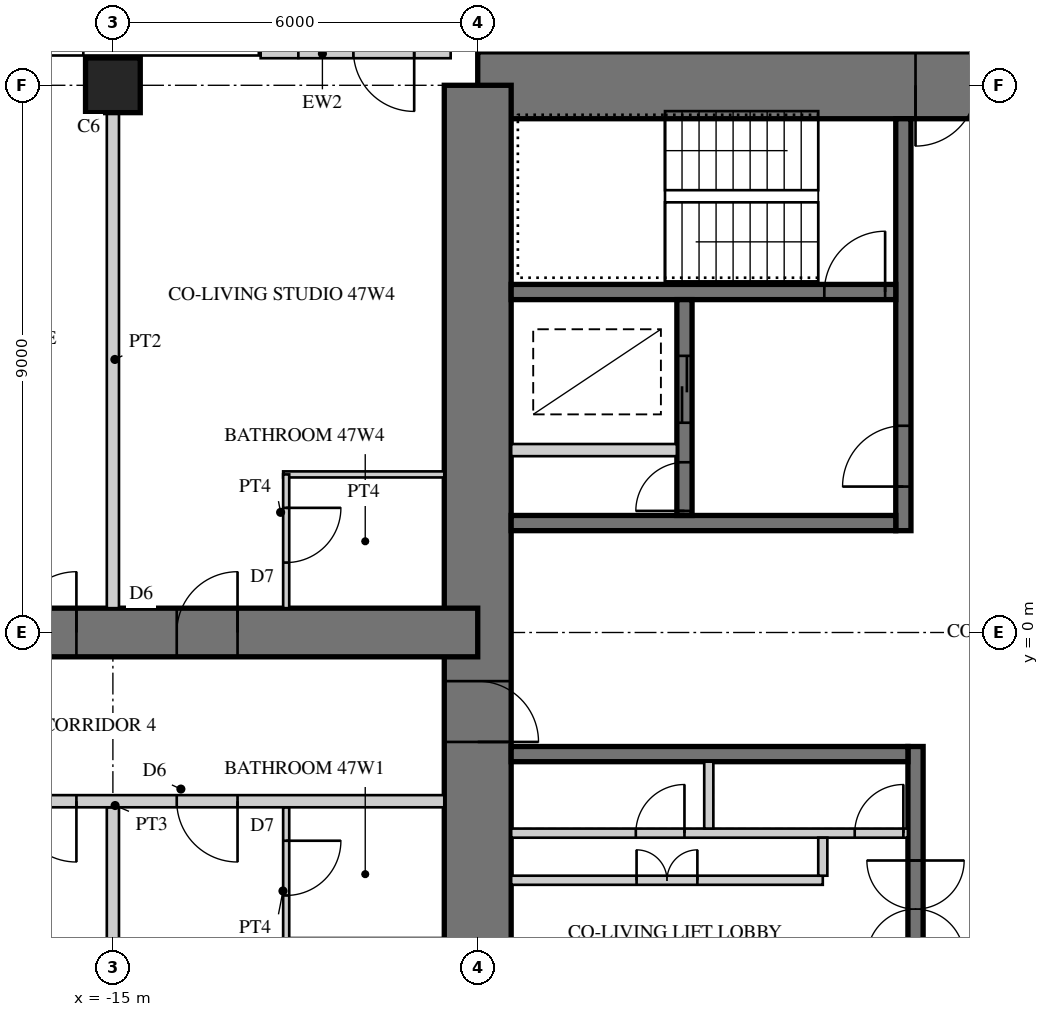
"""IFC4 building model, lengths in metres.
Left out: names, types, materials, properties, quantities, classifications, styles, units other than length and angle.
Written with IfcOpenShell. Run it as: python <this file> out.ifc"""

import sys

from ifc_helpers import new_model, si_unit, direction, frame, frame_2d, origin, origin_2d, place, context, subcontext, project, spatial, rectangle, hollow_rectangle, extrude, element, fill, save


model = new_model("IFC4")
c1 = context("Model", 3, precision=1e-05, world=origin(), true_north=direction((0.0, 1.0)))
c2 = subcontext(c1, "Body", "Model", "MODEL_VIEW")
j1 = project(units=[si_unit("LENGTHUNIT", "METRE"), si_unit("PLANEANGLEUNIT", "RADIAN")], contexts=[c1])
p1 = place(None, origin())
s1 = spatial("IfcSite", under=j1, at=p1, CompositionType="ELEMENT")
p2 = place(p1, origin())
s2 = spatial("IfcBuilding", under=s1, at=p2, CompositionType="ELEMENT")
p3 = place(p2, frame((0.0, 0.0, 189.9)))
s3 = spatial("IfcBuildingStorey", under=s2, at=p3, CompositionType="ELEMENT", Elevation=189.9)
p4 = place(p3, frame((9.0, 9.0, 0.0), z_axis=(0.0, 0.0, 1.0), x_axis=(-1.0, 0.0, 0.0)))
e1 = element("IfcWall", 1, at=p4, inside=s3, PredefinedType="SHEAR", context=c2, shape_type="SweptSolid", body=[
    extrude(rectangle(XDim=18.0, YDim=1.1, at=frame_2d((9.0, 0.0))), origin(), (0.0, 0.0, 1.0), 3.4),
])
p5 = place(p4, frame((9.8, 0.0, 0.0)))
e2 = element("IfcOpeningElement", 2, at=p5, cuts=e1, PredefinedType="OPENING", context=c2, shape_type="SweptSolid", body=[
    extrude(rectangle(XDim=1.0, YDim=2.4, at=frame_2d((0.5, 1.2))), frame((0.0, 0.56, 0.0), z_axis=(0.0, -1.0, 0.0), x_axis=(1.0, 0.0, 0.0)), (0.0, 0.0, 1.0), 1.12),
])
p6 = place(p3, frame((-9.0, 9.0, 0.0), z_axis=(0.0, 0.0, 1.0), x_axis=(0.0, -1.0, 0.0)))
e3 = element("IfcWall", 3, at=p6, inside=s3, PredefinedType="SHEAR", context=c2, shape_type="SweptSolid", body=[
    extrude(rectangle(XDim=18.0, YDim=1.1, at=frame_2d((9.0, 0.0))), origin(), (0.0, 0.0, 1.0), 3.4),
])
p7 = place(p6, frame((9.8, 0.0, 0.0)))
e4 = element("IfcOpeningElement", 4, at=p7, cuts=e3, PredefinedType="OPENING", context=c2, shape_type="SweptSolid", body=[
    extrude(rectangle(XDim=1.0, YDim=2.4, at=frame_2d((0.5, 1.2))), frame((0.0, 0.56, 0.0), z_axis=(0.0, -1.0, 0.0), x_axis=(1.0, 0.0, 0.0)), (0.0, 0.0, 1.0), 1.12),
])
p8 = place(p3, frame((-2.0, 1.675, 0.0), z_axis=(0.0, 0.0, 1.0), x_axis=(0.0, 1.0, 0.0)))
e5 = element("IfcWall", 5, at=p8, inside=s3, PredefinedType="SHEAR", context=c2, shape_type="SweptSolid", body=[
    extrude(rectangle(XDim=6.775, YDim=0.25, at=frame_2d((3.387, 0.0))), origin(), (0.0, 0.0, 1.0), 3.4),
])
p9 = place(p8, frame((0.725, 0.0, 0.0)))
e6 = element("IfcOpeningElement", 6, at=p9, cuts=e5, PredefinedType="OPENING", context=c2, shape_type="SweptSolid", body=[
    extrude(rectangle(XDim=1.0, YDim=2.1, at=frame_2d((0.5, 1.05))), frame((0.0, 0.135, 0.0), z_axis=(0.0, -1.0, 0.0), x_axis=(1.0, 0.0, 0.0)), (0.0, 0.0, 1.0), 0.27),
])
p10 = place(p3, frame((-2.125, 1.8, 0.0), z_axis=(0.0, 0.0, 1.0), x_axis=(-1.0, 0.0, 0.0)))
e7 = element("IfcWall", 7, at=p10, inside=s3, PredefinedType="SHEAR", context=c2, shape_type="SweptSolid", body=[
    extrude(rectangle(XDim=6.325, YDim=0.25, at=frame_2d((3.163, 0.0))), origin(), (0.0, 0.0, 1.0), 3.4),
])
p11 = place(p3, frame((-2.125, 5.6, 0.0), z_axis=(0.0, 0.0, 1.0), x_axis=(-1.0, 0.0, 0.0)))
e8 = element("IfcWall", 8, at=p11, inside=s3, PredefinedType="SHEAR", context=c2, shape_type="SweptSolid", body=[
    extrude(rectangle(XDim=6.325, YDim=0.25, at=frame_2d((3.163, 0.0))), origin(), (0.0, 0.0, 1.0), 3.4),
])
p12 = place(p11, frame((0.175, 0.0, 0.0)))
e9 = element("IfcOpeningElement", 9, at=p12, cuts=e8, PredefinedType="OPENING", context=c2, shape_type="SweptSolid", body=[
    extrude(rectangle(XDim=1.0, YDim=2.1, at=frame_2d((0.5, 1.05))), frame((0.0, 0.135, 0.0), z_axis=(0.0, -1.0, 0.0), x_axis=(1.0, 0.0, 0.0)), (0.0, 0.0, 1.0), 0.27),
])
p13 = place(p3, frame((-5.6, 1.925, 0.0), z_axis=(0.0, 0.0, 1.0), x_axis=(0.0, 1.0, 0.0)))
e10 = element("IfcWall", 10, at=p13, inside=s3, PredefinedType="SHEAR", context=c2, shape_type="SweptSolid", body=[
    extrude(rectangle(XDim=3.55, YDim=0.25, at=frame_2d((1.775, 0.0))), origin(), (0.0, 0.0, 1.0), 3.4),
])
p14 = place(p13, frame((1.525, 0.0, 0.0)))
e11 = element("IfcOpeningElement", 11, at=p14, cuts=e10, PredefinedType="OPENING", context=c2, shape_type="SweptSolid", body=[
    extrude(rectangle(XDim=1.1, YDim=2.2, at=frame_2d((0.55, 1.1))), frame((0.0, 0.135, 0.0), z_axis=(0.0, -1.0, 0.0), x_axis=(1.0, 0.0, 0.0)), (0.0, 0.0, 1.0), 0.27),
])
p15 = place(p13, frame((0.075, 0.0, 0.0)))
e12 = element("IfcOpeningElement", 12, at=p15, cuts=e10, PredefinedType="OPENING", context=c2, shape_type="SweptSolid", body=[
    extrude(rectangle(XDim=0.8, YDim=2.1, at=frame_2d((0.4, 1.05))), frame((0.0, 0.135, 0.0), z_axis=(0.0, -1.0, 0.0), x_axis=(1.0, 0.0, 0.0)), (0.0, 0.0, 1.0), 0.27),
])
p16 = place(p3, frame((-5.725, 3.0, 0.0), z_axis=(0.0, 0.0, 1.0), x_axis=(-1.0, 0.0, 0.0)))
e13 = element("IfcWall", 13, at=p16, inside=s3, PredefinedType="PARTITIONING", context=c2, shape_type="SweptSolid", body=[
    extrude(rectangle(XDim=2.725, YDim=0.2, at=frame_2d((1.362, 0.0))), origin(), (0.0, 0.0, 1.0), 3.4),
])
p17 = place(p3, frame((-1.8, -1.875, 0.0), z_axis=(0.0, 0.0, 1.0), x_axis=(0.0, -1.0, 0.0)))
e14 = element("IfcWall", 14, at=p17, inside=s3, PredefinedType="SHEAR", context=c2, shape_type="SweptSolid", body=[
    extrude(rectangle(XDim=6.575, YDim=0.25, at=frame_2d((3.288, 0.0))), origin(), (0.0, 0.0, 1.0), 3.4),
])
p18 = place(p17, frame((1.875, 0.0, 0.0)))
e15 = element("IfcOpeningElement", 15, at=p18, cuts=e14, PredefinedType="OPENING", context=c2, shape_type="SweptSolid", body=[
    extrude(rectangle(XDim=1.6, YDim=2.4, at=frame_2d((0.8, 1.2))), frame((0.0, 0.135, 0.0), z_axis=(0.0, -1.0, 0.0), x_axis=(1.0, 0.0, 0.0)), (0.0, 0.0, 1.0), 0.27),
])
p19 = place(p3, frame((-1.925, -2.0, 0.0), z_axis=(0.0, 0.0, 1.0), x_axis=(-1.0, 0.0, 0.0)))
e16 = element("IfcWall", 16, at=p19, inside=s3, PredefinedType="SHEAR", context=c2, shape_type="SweptSolid", body=[
    extrude(rectangle(XDim=6.525, YDim=0.25, at=frame_2d((3.262, 0.0))), origin(), (0.0, 0.0, 1.0), 3.4),
])
p20 = place(p3, frame((-1.925, -3.3, 0.0), z_axis=(0.0, 0.0, 1.0), x_axis=(-1.0, 0.0, 0.0)))
e17 = element("IfcWall", 17, at=p20, inside=s3, PredefinedType="PARTITIONING", context=c2, shape_type="SweptSolid", body=[
    extrude(rectangle(XDim=6.525, YDim=0.15, at=frame_2d((3.262, 0.0))), origin(), (0.0, 0.0, 1.0), 3.4),
])
p21 = place(p20, frame((0.075, 0.0, 0.0)))
e18 = element("IfcOpeningElement", 18, at=p21, cuts=e17, PredefinedType="OPENING", context=c2, shape_type="SweptSolid", body=[
    extrude(rectangle(XDim=0.8, YDim=2.1, at=frame_2d((0.4, 1.05))), frame((0.0, 0.085, 0.0), z_axis=(0.0, -1.0, 0.0), x_axis=(1.0, 0.0, 0.0)), (0.0, 0.0, 1.0), 0.17),
])
p22 = place(p20, frame((3.675, 0.0, 0.0)))
e19 = element("IfcOpeningElement", 19, at=p22, cuts=e17, PredefinedType="OPENING", context=c2, shape_type="SweptSolid", body=[
    extrude(rectangle(XDim=0.8, YDim=2.1, at=frame_2d((0.4, 1.05))), frame((0.0, 0.085, 0.0), z_axis=(0.0, -1.0, 0.0), x_axis=(1.0, 0.0, 0.0)), (0.0, 0.0, 1.0), 0.17),
])
p23 = place(p3, frame((-5.2, -2.125, 0.0), z_axis=(0.0, 0.0, 1.0), x_axis=(0.0, -1.0, 0.0)))
e20 = element("IfcWall", 20, at=p23, inside=s3, PredefinedType="PARTITIONING", context=c2, shape_type="SweptSolid", body=[
    extrude(rectangle(XDim=1.1, YDim=0.15, at=frame_2d((0.55, 0.0))), origin(), (0.0, 0.0, 1.0), 3.4),
])
p24 = place(p3, frame((-9.0, 0.0, 0.0), z_axis=(0.0, 0.0, 1.0), x_axis=(-1.0, 0.0, 0.0)))
e21 = element("IfcWall", 21, at=p24, inside=s3, PredefinedType="SHEAR", context=c2, shape_type="SweptSolid", body=[
    extrude(rectangle(XDim=18.0, YDim=0.8, at=frame_2d((9.0, 0.0))), origin(), (0.0, 0.0, 1.0), 3.4),
])
p25 = place(p24, frame((3.95, 0.0, 0.0)))
e22 = element("IfcOpeningElement", 22, at=p25, cuts=e21, PredefinedType="OPENING", context=c2, shape_type="SweptSolid", body=[
    extrude(rectangle(XDim=1.0, YDim=2.15, at=frame_2d((0.5, 1.075))), frame((0.0, 0.41, 0.0), z_axis=(0.0, -1.0, 0.0), x_axis=(1.0, 0.0, 0.0)), (0.0, 0.0, 1.0), 0.82),
])
p26 = place(p24, frame((6.6, 0.0, 0.0)))
e23 = element("IfcOpeningElement", 23, at=p26, cuts=e21, PredefinedType="OPENING", context=c2, shape_type="SweptSolid", body=[
    extrude(rectangle(XDim=1.0, YDim=2.15, at=frame_2d((0.5, 1.075))), frame((0.0, 0.41, 0.0), z_axis=(0.0, -1.0, 0.0), x_axis=(1.0, 0.0, 0.0)), (0.0, 0.0, 1.0), 0.82),
])
p27 = place(p24, frame((13.25, 0.0, 0.0)))
e24 = element("IfcOpeningElement", 24, at=p27, cuts=e21, PredefinedType="OPENING", context=c2, shape_type="SweptSolid", body=[
    extrude(rectangle(XDim=1.0, YDim=2.2, at=frame_2d((0.5, 1.1))), frame((0.0, 0.41, 0.0), z_axis=(0.0, -1.0, 0.0), x_axis=(1.0, 0.0, 0.0)), (0.0, 0.0, 1.0), 0.82),
])
p28 = place(p3, frame((-15.0, 9.0, 0.0), z_axis=(0.0, 0.0, 1.0), x_axis=(1.0, 0.0, 0.0)))
e25 = element("IfcColumn", 25, at=p28, inside=s3, PredefinedType="COLUMN", context=c2, shape_type="SweptSolid", body=[
    extrude(rectangle(XDim=0.9, YDim=0.9, at=origin_2d()), origin(), (0.0, 0.0, 1.0), 3.4),
])
p29 = place(p3, frame((-9.445, 9.57, 0.0), z_axis=(0.0, 0.0, 1.0), x_axis=(-1.0, 0.0, 0.0)))
e26 = element("IfcWall", 26, at=p29, inside=s3, PredefinedType="SOLIDWALL", context=c2, shape_type="SweptSolid", body=[
    extrude(rectangle(XDim=3.125, YDim=0.25, at=frame_2d((1.562, 0.0))), origin(), (0.0, 0.0, 1.0), 3.22),
])
p30 = place(p29, frame((0.6, 0.0, 0.0)))
e27 = element("IfcOpeningElement", 27, at=p30, cuts=e26, PredefinedType="OPENING", context=c2, shape_type="SweptSolid", body=[
    extrude(rectangle(XDim=1.0, YDim=2.2, at=frame_2d((0.5, 1.1))), frame((0.0, 0.135, 0.0), z_axis=(0.0, -1.0, 0.0), x_axis=(1.0, 0.0, 0.0)), (0.0, 0.0, 1.0), 0.27),
])
p31 = place(p3, frame((-3.325, -4.075, 0.0), z_axis=(0.0, 0.0, 1.0), x_axis=(-1.0, 0.0, 0.0)))
e28 = element("IfcWall", 28, at=p31, inside=s3, PredefinedType="PARTITIONING", context=c2, shape_type="SweptSolid", body=[
    extrude(rectangle(XDim=5.125, YDim=0.15, at=frame_2d((2.562, 0.0))), origin(), (0.0, 0.0, 1.0), 3.22),
])
p32 = place(p31, frame((2.062, 0.0, 0.0)))
e29 = element("IfcOpeningElement", 29, at=p32, cuts=e28, PredefinedType="OPENING", context=c2, shape_type="SweptSolid", body=[
    extrude(rectangle(XDim=1.0, YDim=2.1, at=frame_2d((0.5, 1.05))), frame((0.0, 0.085, 0.0), z_axis=(0.0, -1.0, 0.0), x_axis=(1.0, 0.0, 0.0)), (0.0, 0.0, 1.0), 0.17),
])
p33 = place(p3, frame((-3.325, -3.375, 0.0), z_axis=(0.0, 0.0, 1.0), x_axis=(0.0, -1.0, 0.0)))
e30 = element("IfcWall", 30, at=p33, inside=s3, PredefinedType="PARTITIONING", context=c2, shape_type="SweptSolid", body=[
    extrude(rectangle(XDim=0.625, YDim=0.15, at=frame_2d((0.312, 0.0))), origin(), (0.0, 0.0, 1.0), 3.22),
])
p34 = place(p3, frame((-12.15, -2.875, 0.0), z_axis=(0.0, 0.0, 1.0), x_axis=(0.0, -1.0, 0.0)))
e31 = element("IfcWall", 31, at=p34, inside=s3, PredefinedType="PARTITIONING", context=c2, shape_type="SweptSolid", body=[
    extrude(rectangle(XDim=2.2, YDim=0.1, at=frame_2d((1.1, 0.0))), origin(), (0.0, 0.0, 1.0), 3.22),
])
p35 = place(p34, frame((0.55, 0.0, 0.0)))
e32 = element("IfcOpeningElement", 32, at=p35, cuts=e31, PredefinedType="OPENING", context=c2, shape_type="SweptSolid", body=[
    extrude(rectangle(XDim=0.9, YDim=2.1, at=frame_2d((0.45, 1.05))), frame((0.0, 0.06, 0.0), z_axis=(0.0, -1.0, 0.0), x_axis=(1.0, 0.0, 0.0)), (0.0, 0.0, 1.0), 0.12),
])
p36 = place(p3, frame((-9.55, 2.6, 0.0), z_axis=(0.0, 0.0, 1.0), x_axis=(-1.0, 0.0, 0.0)))
e33 = element("IfcWall", 33, at=p36, inside=s3, PredefinedType="PARTITIONING", context=c2, shape_type="SweptSolid", body=[
    extrude(rectangle(XDim=2.65, YDim=0.1, at=frame_2d((1.325, 0.0))), origin(), (0.0, 0.0, 1.0), 3.22),
])
p37 = place(p3, frame((-12.15, 2.6, 0.0), z_axis=(0.0, 0.0, 1.0), x_axis=(0.0, -1.0, 0.0)))
e34 = element("IfcWall", 34, at=p37, inside=s3, PredefinedType="PARTITIONING", context=c2, shape_type="SweptSolid", body=[
    extrude(rectangle(XDim=2.2, YDim=0.1, at=frame_2d((1.1, 0.0))), origin(), (0.0, 0.0, 1.0), 3.22),
])
p38 = place(p37, frame((0.55, 0.0, 0.0)))
e35 = element("IfcOpeningElement", 35, at=p38, cuts=e34, PredefinedType="OPENING", context=c2, shape_type="SweptSolid", body=[
    extrude(rectangle(XDim=0.9, YDim=2.1, at=frame_2d((0.45, 1.05))), frame((0.0, 0.06, 0.0), z_axis=(0.0, -1.0, 0.0), x_axis=(1.0, 0.0, 0.0)), (0.0, 0.0, 1.0), 0.12),
])
p39 = place(p3, frame((-15.0, -2.875, 0.0), z_axis=(0.0, 0.0, 1.0), x_axis=(0.0, -1.0, 0.0)))
e36 = element("IfcWall", 36, at=p39, inside=s3, PredefinedType="SOLIDWALL", context=c2, shape_type="SweptSolid", body=[
    extrude(rectangle(XDim=5.675, YDim=0.2, at=frame_2d((2.837, 0.0))), origin(), (0.0, 0.0, 1.0), 2.47),
])
p40 = place(p3, frame((-15.0, 8.55, 0.0), z_axis=(0.0, 0.0, 1.0), x_axis=(0.0, -1.0, 0.0)))
e37 = element("IfcWall", 37, at=p40, inside=s3, PredefinedType="SOLIDWALL", context=c2, shape_type="SweptSolid", body=[
    extrude(rectangle(XDim=8.15, YDim=0.2, at=frame_2d((4.075, 0.0))), origin(), (0.0, 0.0, 1.0), 2.47),
])
p41 = place(p3, frame((-9.55, -2.775, 0.0), z_axis=(0.0, 0.0, 1.0), x_axis=(-1.0, 0.0, 0.0)))
e38 = element("IfcWall", 38, at=p41, inside=s3, PredefinedType="SOLIDWALL", context=c2, shape_type="SweptSolid", body=[
    extrude(rectangle(XDim=11.45, YDim=0.2, at=frame_2d((5.725, 0.0))), origin(), (0.0, 0.0, 1.0), 3.22),
])
p42 = place(p41, frame((3.4, 0.0, 0.0)))
e39 = element("IfcOpeningElement", 39, at=p42, cuts=e38, PredefinedType="OPENING", context=c2, shape_type="SweptSolid", body=[
    extrude(rectangle(XDim=1.0, YDim=2.15, at=frame_2d((0.5, 1.075))), frame((0.0, 0.11, 0.0), z_axis=(0.0, -1.0, 0.0), x_axis=(1.0, 0.0, 0.0)), (0.0, 0.0, 1.0), 0.22),
])
p43 = place(p41, frame((6.05, 0.0, 0.0)))
e40 = element("IfcOpeningElement", 40, at=p43, cuts=e38, PredefinedType="OPENING", context=c2, shape_type="SweptSolid", body=[
    extrude(rectangle(XDim=1.0, YDim=2.15, at=frame_2d((0.5, 1.075))), frame((0.0, 0.11, 0.0), z_axis=(0.0, -1.0, 0.0), x_axis=(1.0, 0.0, 0.0)), (0.0, 0.0, 1.0), 0.22),
])
p44 = place(p30, origin())
e41 = element("IfcDoor", 41, at=p44, inside=s3, OperationType="SINGLE_SWING_LEFT", PredefinedType="DOOR", context=c2, shape_type="SweptSolid", body=[
    extrude(hollow_rectangle(XDim=1.0, YDim=2.2, WallThickness=0.06, at=frame_2d((0.5, 1.1))), frame((0.0, 0.025, 0.0), z_axis=(0.0, -1.0, 0.0), x_axis=(1.0, 0.0, 0.0)), (0.0, 0.0, 1.0), 0.05),
    extrude(rectangle(XDim=0.879, YDim=2.079, at=frame_2d((0.5, 1.1))), frame((0.0, 0.025, 0.0), z_axis=(0.0, -1.0, 0.0), x_axis=(1.0, 0.0, 0.0)), (0.0, 0.0, 1.0), 0.05),
])
fill(e27, e41)
p45 = place(p32, frame((1.0, 0.0, 0.0), z_axis=(0.0, 0.0, 1.0), x_axis=(-1.0, 0.0, 0.0)))
e42 = element("IfcDoor", 42, at=p45, inside=s3, OperationType="DOUBLE_DOOR_SINGLE_SWING", PredefinedType="DOOR", context=c2, shape_type="SweptSolid", body=[
    extrude(rectangle(XDim=1.0, YDim=2.1, at=frame_2d((0.5, 1.05))), frame((0.0, 0.025, 0.0), z_axis=(0.0, -1.0, 0.0), x_axis=(1.0, 0.0, 0.0)), (0.0, 0.0, 1.0), 0.05),
])
fill(e29, e42)
p46 = place(p35, origin())
e43 = element("IfcDoor", 43, at=p46, inside=s3, OperationType="SINGLE_SWING_LEFT", PredefinedType="DOOR", context=c2, shape_type="SweptSolid", body=[
    extrude(rectangle(XDim=0.9, YDim=2.1, at=frame_2d((0.45, 1.05))), frame((0.0, 0.025, 0.0), z_axis=(0.0, -1.0, 0.0), x_axis=(1.0, 0.0, 0.0)), (0.0, 0.0, 1.0), 0.05),
])
fill(e32, e43)
p47 = place(p38, origin())
e44 = element("IfcDoor", 44, at=p47, inside=s3, OperationType="SINGLE_SWING_LEFT", PredefinedType="DOOR", context=c2, shape_type="SweptSolid", body=[
    extrude(rectangle(XDim=0.9, YDim=2.1, at=frame_2d((0.45, 1.05))), frame((0.0, 0.025, 0.0), z_axis=(0.0, -1.0, 0.0), x_axis=(1.0, 0.0, 0.0)), (0.0, 0.0, 1.0), 0.05),
])
fill(e35, e44)
p48 = place(p42, origin())
e45 = element("IfcDoor", 45, at=p48, inside=s3, OperationType="SINGLE_SWING_LEFT", PredefinedType="DOOR", context=c2, shape_type="SweptSolid", body=[
    extrude(rectangle(XDim=1.0, YDim=2.15, at=frame_2d((0.5, 1.075))), frame((0.0, 0.025, 0.0), z_axis=(0.0, -1.0, 0.0), x_axis=(1.0, 0.0, 0.0)), (0.0, 0.0, 1.0), 0.05),
])
fill(e39, e45)
p49 = place(p43, origin())
e46 = element("IfcDoor", 46, at=p49, inside=s3, OperationType="SINGLE_SWING_LEFT", PredefinedType="DOOR", context=c2, shape_type="SweptSolid", body=[
    extrude(rectangle(XDim=1.0, YDim=2.15, at=frame_2d((0.5, 1.075))), frame((0.0, 0.025, 0.0), z_axis=(0.0, -1.0, 0.0), x_axis=(1.0, 0.0, 0.0)), (0.0, 0.0, 1.0), 0.05),
])
fill(e40, e46)
p50 = place(p25, frame((1.0, 0.0, 0.0), z_axis=(0.0, 0.0, 1.0), x_axis=(-1.0, 0.0, 0.0)))
e47 = element("IfcDoor", 47, at=p50, inside=s3, OperationType="SINGLE_SWING_RIGHT", PredefinedType="DOOR", context=c2, shape_type="SweptSolid", body=[
    extrude(rectangle(XDim=1.0, YDim=2.15, at=frame_2d((0.5, 1.075))), frame((0.0, 0.025, 0.0), z_axis=(0.0, -1.0, 0.0), x_axis=(1.0, 0.0, 0.0)), (0.0, 0.0, 1.0), 0.05),
])
fill(e22, e47)
p51 = place(p26, frame((1.0, 0.0, 0.0), z_axis=(0.0, 0.0, 1.0), x_axis=(-1.0, 0.0, 0.0)))
e48 = element("IfcDoor", 48, at=p51, inside=s3, OperationType="SINGLE_SWING_RIGHT", PredefinedType="DOOR", context=c2, shape_type="SweptSolid", body=[
    extrude(rectangle(XDim=1.0, YDim=2.15, at=frame_2d((0.5, 1.075))), frame((0.0, 0.025, 0.0), z_axis=(0.0, -1.0, 0.0), x_axis=(1.0, 0.0, 0.0)), (0.0, 0.0, 1.0), 0.05),
])
fill(e23, e48)
p52 = place(p5, origin())
e49 = element("IfcDoor", 49, at=p52, inside=s3, OperationType="SINGLE_SWING_RIGHT", PredefinedType="DOOR", context=c2, shape_type="SweptSolid", body=[
    extrude(rectangle(XDim=1.0, YDim=2.4, at=frame_2d((0.5, 1.2))), frame((0.0, 0.055, 0.0), z_axis=(0.0, -1.0, 0.0), x_axis=(1.0, 0.0, 0.0)), (0.0, 0.0, 1.0), 0.05),
])
fill(e2, e49)
p53 = place(p7, origin())
e50 = element("IfcDoor", 50, at=p53, inside=s3, OperationType="SINGLE_SWING_RIGHT", PredefinedType="DOOR", context=c2, shape_type="SweptSolid", body=[
    extrude(rectangle(XDim=1.0, YDim=2.4, at=frame_2d((0.5, 1.2))), frame((0.0, 0.055, 0.0), z_axis=(0.0, -1.0, 0.0), x_axis=(1.0, 0.0, 0.0)), (0.0, 0.0, 1.0), 0.05),
])
fill(e4, e50)
p54 = place(p9, origin())
e51 = element("IfcDoor", 51, at=p54, inside=s3, OperationType="SINGLE_SWING_LEFT", PredefinedType="DOOR", context=c2, shape_type="SweptSolid", body=[
    extrude(rectangle(XDim=1.0, YDim=2.1, at=frame_2d((0.5, 1.05))), frame((0.0, 0.025, 0.0), z_axis=(0.0, -1.0, 0.0), x_axis=(1.0, 0.0, 0.0)), (0.0, 0.0, 1.0), 0.05),
])
fill(e6, e51)
p55 = place(p12, frame((1.0, 0.0, 0.0), z_axis=(0.0, 0.0, 1.0), x_axis=(-1.0, 0.0, 0.0)))
e52 = element("IfcDoor", 52, at=p55, inside=s3, OperationType="SINGLE_SWING_RIGHT", PredefinedType="DOOR", context=c2, shape_type="SweptSolid", body=[
    extrude(rectangle(XDim=1.0, YDim=2.1, at=frame_2d((0.5, 1.05))), frame((0.0, 0.025, 0.0), z_axis=(0.0, -1.0, 0.0), x_axis=(1.0, 0.0, 0.0)), (0.0, 0.0, 1.0), 0.05),
])
fill(e9, e52)
p56 = place(p14, origin())
e53 = element("IfcDoor", 53, at=p56, inside=s3, OperationType="DOUBLE_DOOR_SLIDING", PredefinedType="DOOR", context=c2, shape_type="SweptSolid", body=[
    extrude(rectangle(XDim=1.1, YDim=2.2, at=frame_2d((0.55, 1.1))), frame((0.0, 0.025, 0.0), z_axis=(0.0, -1.0, 0.0), x_axis=(1.0, 0.0, 0.0)), (0.0, 0.0, 1.0), 0.05),
])
fill(e11, e53)
p57 = place(p15, origin())
e54 = element("IfcDoor", 54, at=p57, inside=s3, OperationType="SINGLE_SWING_LEFT", PredefinedType="DOOR", context=c2, shape_type="SweptSolid", body=[
    extrude(rectangle(XDim=0.8, YDim=2.1, at=frame_2d((0.4, 1.05))), frame((0.0, 0.025, 0.0), z_axis=(0.0, -1.0, 0.0), x_axis=(1.0, 0.0, 0.0)), (0.0, 0.0, 1.0), 0.05),
])
fill(e12, e54)
p58 = place(p18, origin())
e55 = element("IfcDoor", 55, at=p58, inside=s3, OperationType="DOUBLE_DOOR_DOUBLE_SWING", PredefinedType="DOOR", context=c2, shape_type="SweptSolid", body=[
    extrude(rectangle(XDim=1.6, YDim=2.4, at=frame_2d((0.8, 1.2))), frame((0.0, 0.025, 0.0), z_axis=(0.0, -1.0, 0.0), x_axis=(1.0, 0.0, 0.0)), (0.0, 0.0, 1.0), 0.05),
])
fill(e15, e55)
p59 = place(p21, frame((0.8, 0.0, 0.0), z_axis=(0.0, 0.0, 1.0), x_axis=(-1.0, 0.0, 0.0)))
e56 = element("IfcDoor", 56, at=p59, inside=s3, OperationType="SINGLE_SWING_RIGHT", PredefinedType="DOOR", context=c2, shape_type="SweptSolid", body=[
    extrude(rectangle(XDim=0.8, YDim=2.1, at=frame_2d((0.4, 1.05))), frame((0.0, 0.025, 0.0), z_axis=(0.0, -1.0, 0.0), x_axis=(1.0, 0.0, 0.0)), (0.0, 0.0, 1.0), 0.05),
])
fill(e18, e56)
p60 = place(p22, frame((0.8, 0.0, 0.0), z_axis=(0.0, 0.0, 1.0), x_axis=(-1.0, 0.0, 0.0)))
e57 = element("IfcDoor", 57, at=p60, inside=s3, OperationType="SINGLE_SWING_RIGHT", PredefinedType="DOOR", context=c2, shape_type="SweptSolid", body=[
    extrude(rectangle(XDim=0.8, YDim=2.1, at=frame_2d((0.4, 1.05))), frame((0.0, 0.025, 0.0), z_axis=(0.0, -1.0, 0.0), x_axis=(1.0, 0.0, 0.0)), (0.0, 0.0, 1.0), 0.05),
])
fill(e19, e57)
save(model, sys.argv[1])
